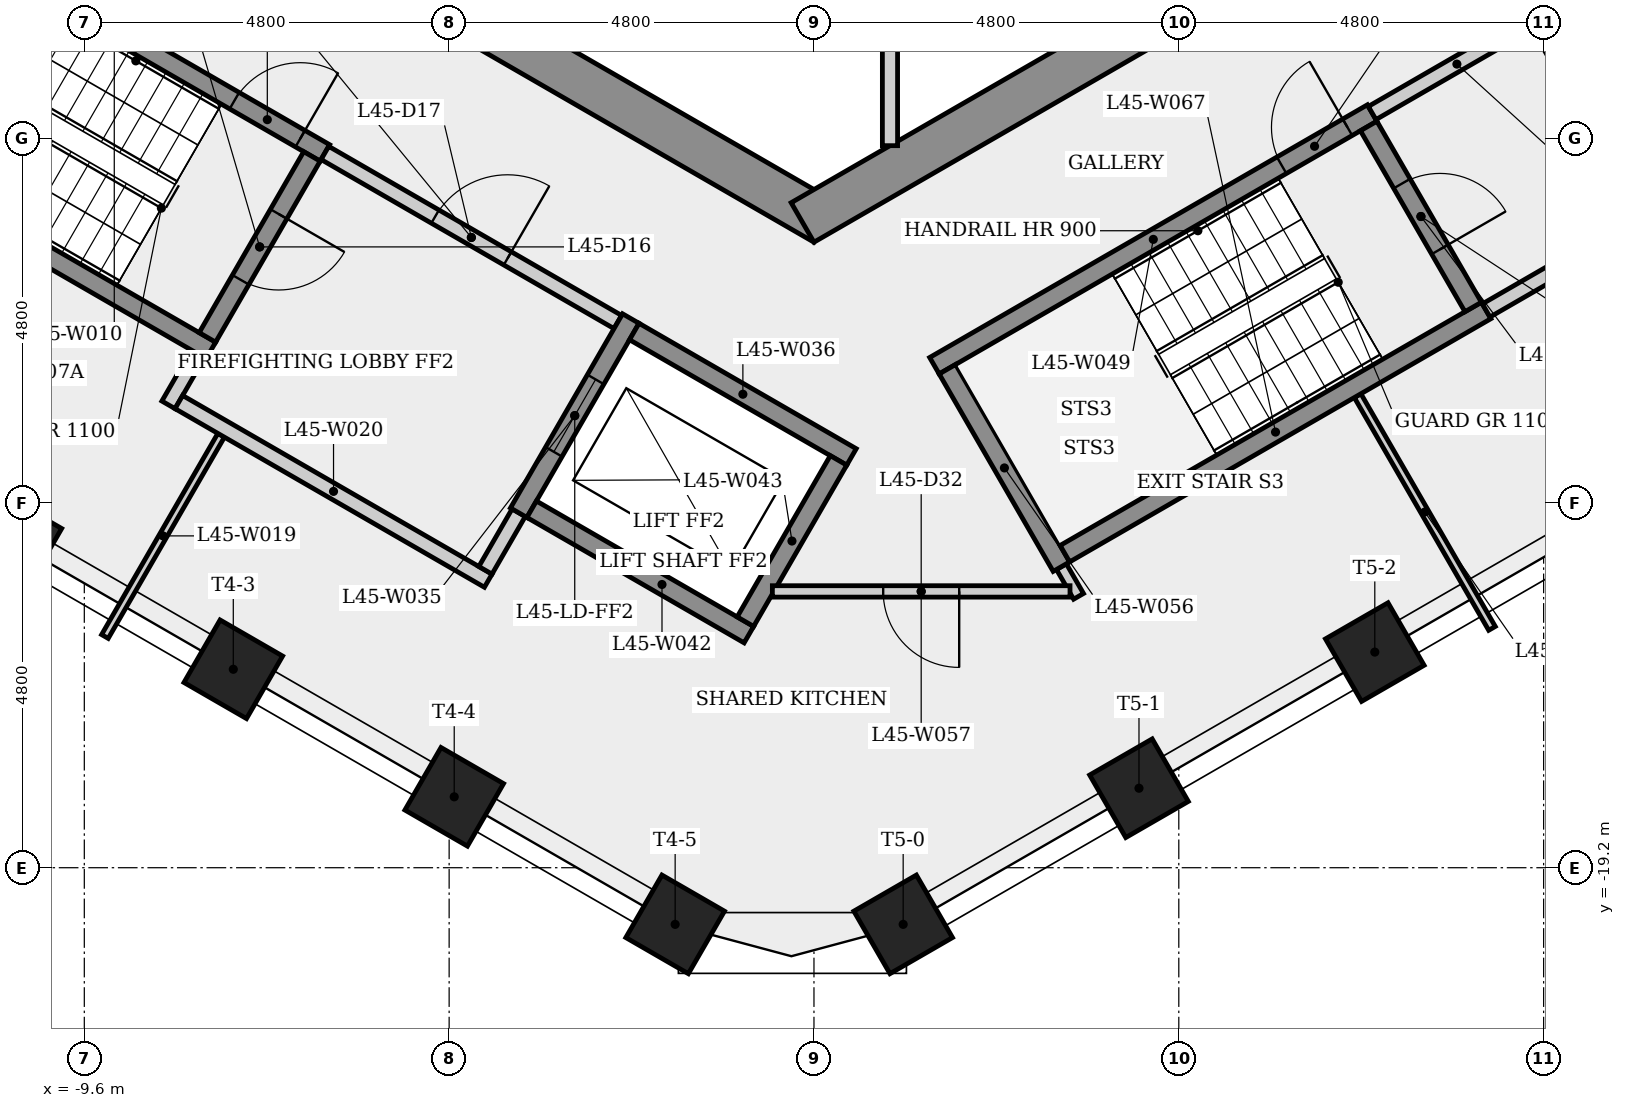
"""IFC4 building model, lengths in metres.
Left out: names, types, materials, properties, quantities, classifications, styles, units other than length and angle.
Written with IfcOpenShell. Run it as: python <this file> out.ifc"""

import sys

from ifc_helpers import new_model, si_unit, direction, frame, frame_2d, origin, origin_2d, place, context, subcontext, project, spatial, rectangle, extrude, element, fill, save


model = new_model("IFC4")
c1 = context("Model", 3, precision=1e-05, world=origin(), true_north=direction((0.0, 1.0)))
c2 = subcontext(c1, "Body", "Model", "MODEL_VIEW")
j1 = project(units=[si_unit("LENGTHUNIT", "METRE"), si_unit("PLANEANGLEUNIT", "RADIAN")], contexts=[c1])
p1 = place(None, origin())
s1 = spatial("IfcSite", under=j1, at=p1, CompositionType="ELEMENT")
p2 = place(p1, origin())
s2 = spatial("IfcBuilding", under=s1, at=p2, CompositionType="ELEMENT")
p3 = place(p2, frame((0.0, 0.0, 169.7)))
s3 = spatial("IfcBuildingStorey", under=s2, at=p3, CompositionType="ELEMENT", Elevation=169.7)
p4 = place(p3, frame((-9.35, -5.225, 0.0), z_axis=(0.0, 0.0, 1.0), x_axis=(0.866023993627, -0.500002442456, 0.0)))
e1 = element("IfcWall", 1, at=p4, inside=s3, PredefinedType="SHEAR", context=c2, shape_type="SweptSolid", body=[
    extrude(rectangle(XDim=10.97, YDim=0.6, at=frame_2d((5.485, 0.0))), origin(), (0.0, 0.0, 1.0), 3.4),
])
p5 = place(p4, frame((5.045, 0.0, 0.0)))
e2 = element("IfcOpeningElement", 2, at=p5, cuts=e1, PredefinedType="OPENING", context=c2, shape_type="SweptSolid", body=[
    extrude(rectangle(XDim=0.9, YDim=2.1, at=frame_2d((0.45, 1.05))), frame((0.0, 0.31, 0.0), z_axis=(0.0, -1.0, 0.0), x_axis=(1.0, 0.0, 0.0)), (0.0, 0.0, 1.0), 0.62),
])
p6 = place(p3, frame((-0.15, -10.71, 0.0), z_axis=(0.0, 0.0, 1.0), x_axis=(0.866023993627, 0.500002442456, 0.0)))
e3 = element("IfcWall", 3, at=p6, inside=s3, PredefinedType="SHEAR", context=c2, shape_type="SweptSolid", body=[
    extrude(rectangle(XDim=10.97, YDim=0.6, at=frame_2d((5.485, 0.0))), origin(), (0.0, 0.0, 1.0), 3.4),
])
p7 = place(p6, frame((7.281, 0.0, 0.0)))
e4 = element("IfcOpeningElement", 4, at=p7, cuts=e3, PredefinedType="OPENING", context=c2, shape_type="SweptSolid", body=[
    extrude(rectangle(XDim=0.9, YDim=2.1, at=frame_2d((0.45, 1.05))), frame((0.0, 0.31, 0.0), z_axis=(0.0, -1.0, 0.0), x_axis=(1.0, 0.0, 0.0)), (0.0, 0.0, 1.0), 0.62),
])
for number, where, z_axis, x_axis in (
    (5, (-10.547, -14.911, 0.0), (0.0, 0.0, 1.0), (-0.5, -0.866, 0.0)),
    (6, (-7.64, -16.589, 0.0), (0.0, 0.0, 1.0), (-0.5, -0.866, 0.0)),
    (7, (-4.733, -18.267, 0.0), (0.0, 0.0, 1.0), (-0.5, -0.866, 0.0)),
    (8, (-1.826, -19.946, 0.0), (0.0, 0.0, 1.0), (-0.5, -0.866, 0.0)),
    (9, (1.174, -19.946, 0.0), (0.0, 0.0, 1.0), (0.5, -0.866, 0.0)),
    (10, (4.276, -18.154, 0.0), (0.0, 0.0, 1.0), (0.5, -0.866, 0.0)),
    (11, (7.379, -16.363, 0.0), (0.0, 0.0, 1.0), (0.5, -0.866, 0.0)),
):
    element("IfcColumn", number, at=place(p3, frame(where, z_axis=z_axis, x_axis=x_axis)), inside=s3, PredefinedType="COLUMN", context=c2, shape_type="SweptSolid", body=[
        extrude(rectangle(XDim=0.95, YDim=0.95, at=origin_2d()), origin(), (0.0, 0.0, 1.0), 3.4),
    ])
p8 = place(p3, frame((-11.977, -6.595, 0.0), z_axis=(0.0, 0.0, 1.0), x_axis=(0.866025499775, -0.499999833739, 0.0)))
e12 = element("IfcWall", 12, at=p8, inside=s3, PredefinedType="SHEAR", context=c2, shape_type="SweptSolid", body=[
    extrude(rectangle(XDim=6.4, YDim=0.25, at=frame_2d((3.2, 0.0))), origin(), (0.0, 0.0, 1.0), 3.05),
])
p9 = place(p8, frame((5.025, 0.0, 0.0)))
e13 = element("IfcOpeningElement", 13, at=p9, cuts=e12, PredefinedType="OPENING", context=c2, shape_type="SweptSolid", body=[
    extrude(rectangle(XDim=1.0, YDim=2.1, at=frame_2d((0.5, 1.05))), frame((0.0, 0.135, 0.0), z_axis=(0.0, -1.0, 0.0), x_axis=(1.0, 0.0, 0.0)), (0.0, 0.0, 1.0), 0.27),
])
p10 = place(p3, frame((-8.493, -13.11, 0.0), z_axis=(0.0, 0.0, 1.0), x_axis=(0.500067724834, 0.865986299303, 0.0)))
e14 = element("IfcWall", 14, at=p10, inside=s3, PredefinedType="PARTITIONING", context=c2, shape_type="SweptSolid", body=[
    extrude(rectangle(XDim=0.775, YDim=0.2, at=frame_2d((0.388, 0.0))), origin(), (0.0, 0.0, 1.0), 3.05),
])
p11 = place(p3, frame((-7.935, -12.393, 0.0), z_axis=(0.0, 0.0, 1.0), x_axis=(-0.866025499775, 0.499999833739, 0.0)))
e15 = element("IfcWall", 15, at=p11, inside=s3, PredefinedType="SHEAR", context=c2, shape_type="SweptSolid", body=[
    extrude(rectangle(XDim=6.4, YDim=0.25, at=frame_2d((3.2, 0.0))), origin(), (0.0, 0.0, 1.0), 3.05),
])
p12 = place(p3, frame((-7.8, -13.51, 0.0), z_axis=(0.0, 0.0, 1.0), x_axis=(-0.500003532061, -0.866023364538, 0.0)))
e16 = element("IfcWall", 16, at=p12, inside=s3, PredefinedType="PARTITIONING", context=c2, shape_type="SweptSolid", body=[
    extrude(rectangle(XDim=3.058, YDim=0.1, at=frame_2d((1.529, 0.0))), origin(), (0.0, 0.0, 1.0), 3.05),
])
p13 = place(p3, frame((-8.356, -13.073, 0.0), z_axis=(0.0, 0.0, 1.0), x_axis=(0.866038532462, -0.499977259774, 0.0)))
e17 = element("IfcWall", 17, at=p13, inside=s3, PredefinedType="PARTITIONING", context=c2, shape_type="SweptSolid", body=[
    extrude(rectangle(XDim=4.7, YDim=0.2, at=frame_2d((2.35, 0.0))), origin(), (0.0, 0.0, 1.0), 3.05),
])
p14 = place(p3, frame((-6.605, -9.841, 0.0), z_axis=(0.0, 0.0, 1.0), x_axis=(-0.499996545922, -0.866027397988, 0.0)))
e18 = element("IfcWall", 18, at=p14, inside=s3, PredefinedType="SHEAR", context=c2, shape_type="SweptSolid", body=[
    extrude(rectangle(XDim=2.75, YDim=0.25, at=frame_2d((1.375, 0.0))), origin(), (0.0, 0.0, 1.0), 3.05),
])
p15 = place(p14, frame((0.875, 0.0, 0.0)))
e19 = element("IfcOpeningElement", 19, at=p15, cuts=e18, PredefinedType="OPENING", context=c2, shape_type="SweptSolid", body=[
    extrude(rectangle(XDim=1.0, YDim=2.1, at=frame_2d((0.5, 1.05))), frame((0.0, 0.135, 0.0), z_axis=(0.0, -1.0, 0.0), x_axis=(1.0, 0.0, 0.0)), (0.0, 0.0, 1.0), 0.27),
])
p16 = place(p3, frame((-6.435, -9.795, 0.0), z_axis=(0.0, 0.0, 1.0), x_axis=(0.866012907634, -0.500021643343, 0.0)))
e20 = element("IfcWall", 20, at=p16, inside=s3, PredefinedType="PARTITIONING", context=c2, shape_type="SweptSolid", body=[
    extrude(rectangle(XDim=4.45, YDim=0.2, at=frame_2d((2.225, 0.0))), origin(), (0.0, 0.0, 1.0), 3.05),
])
p17 = place(p16, frame((1.675, 0.0, 0.0)))
e21 = element("IfcOpeningElement", 21, at=p17, cuts=e20, PredefinedType="OPENING", context=c2, shape_type="SweptSolid", body=[
    extrude(rectangle(XDim=1.1, YDim=2.1, at=frame_2d((0.55, 1.05))), frame((0.0, 0.11, 0.0), z_axis=(0.0, -1.0, 0.0), x_axis=(1.0, 0.0, 0.0)), (0.0, 0.0, 1.0), 0.22),
])
p18 = place(p3, frame((-3.885, -14.529, 0.0), z_axis=(0.0, 0.0, 1.0), x_axis=(-0.499859285417, -0.866106630146, 0.0)))
e22 = element("IfcWall", 22, at=p18, inside=s3, PredefinedType="PARTITIONING", context=c2, shape_type="SweptSolid", body=[
    extrude(rectangle(XDim=0.875, YDim=0.2, at=frame_2d((0.438, 0.0))), origin(), (0.0, 0.0, 1.0), 3.05),
])
p19 = place(p3, frame((-2.41, -11.974, 0.0), z_axis=(0.0, 0.0, 1.0), x_axis=(-0.500001826776, -0.866024349092, 0.0)))
e23 = element("IfcWall", 23, at=p19, inside=s3, PredefinedType="SHEAR", context=c2, shape_type="SweptSolid", body=[
    extrude(rectangle(XDim=2.95, YDim=0.25, at=frame_2d((1.475, 0.0))), origin(), (0.0, 0.0, 1.0), 3.05),
])
p20 = place(p19, frame((0.925, 0.0, 0.0)))
e24 = element("IfcOpeningElement", 24, at=p20, cuts=e23, PredefinedType="OPENING", context=c2, shape_type="SweptSolid", body=[
    extrude(rectangle(XDim=1.1, YDim=2.1, at=frame_2d((0.55, 1.05))), frame((0.0, 0.135, 0.0), z_axis=(0.0, -1.0, 0.0), x_axis=(1.0, 0.0, 0.0)), (0.0, 0.0, 1.0), 0.27),
])
p21 = place(p3, frame((-2.364, -12.145, 0.0), z_axis=(0.0, 0.0, 1.0), x_axis=(0.866040211805, -0.499974350878, 0.0)))
e25 = element("IfcWall", 25, at=p21, inside=s3, PredefinedType="SHEAR", context=c2, shape_type="SweptSolid", body=[
    extrude(rectangle(XDim=3.3, YDim=0.25, at=frame_2d((1.65, 0.0))), origin(), (0.0, 0.0, 1.0), 3.05),
])
p22 = place(p3, frame((-0.856, -16.133, 0.0), z_axis=(0.0, 0.0, 1.0), x_axis=(-0.866021716278, 0.500006386895, 0.0)))
e26 = element("IfcWall", 26, at=p22, inside=s3, PredefinedType="SHEAR", context=c2, shape_type="SweptSolid", body=[
    extrude(rectangle(XDim=3.3, YDim=0.25, at=frame_2d((1.65, 0.0))), origin(), (0.0, 0.0, 1.0), 3.05),
])
p23 = place(p3, frame((-0.902, -15.962, 0.0), z_axis=(0.0, 0.0, 1.0), x_axis=(0.500061746146, 0.865989751695, 0.0)))
e27 = element("IfcWall", 27, at=p23, inside=s3, PredefinedType="SHEAR", context=c2, shape_type="SweptSolid", body=[
    extrude(rectangle(XDim=2.45, YDim=0.25, at=frame_2d((1.225, 0.0))), origin(), (0.0, 0.0, 1.0), 3.4),
])
p24 = place(p3, frame((1.0, -5.25, 0.0), z_axis=(0.0, 0.0, 1.0), x_axis=(0.0, -1.0, 0.0)))
e28 = element("IfcWall", 28, at=p24, inside=s3, PredefinedType="PARTITIONING", context=c2, shape_type="SweptSolid", body=[
    extrude(rectangle(XDim=4.449, YDim=0.2, at=frame_2d((2.225, 0.0))), origin(), (0.0, 0.0, 1.0), 3.05),
])
p25 = place(p3, frame((1.585, -12.595, 0.0), z_axis=(0.0, 0.0, 1.0), x_axis=(0.866036417653, 0.499980922934, 0.0)))
e29 = element("IfcWall", 29, at=p25, inside=s3, PredefinedType="SHEAR", context=c2, shape_type="SweptSolid", body=[
    extrude(rectangle(XDim=6.65, YDim=0.25, at=frame_2d((3.325, 0.0))), origin(), (0.0, 0.0, 1.0), 3.05),
])
p26 = place(p25, frame((5.275, 0.0, 0.0)))
e30 = element("IfcOpeningElement", 30, at=p26, cuts=e29, PredefinedType="OPENING", context=c2, shape_type="SweptSolid", body=[
    extrude(rectangle(XDim=1.0, YDim=2.1, at=frame_2d((0.5, 1.05))), frame((0.0, 0.135, 0.0), z_axis=(0.0, -1.0, 0.0), x_axis=(1.0, 0.0, 0.0)), (0.0, 0.0, 1.0), 0.27),
])
p27 = place(p3, frame((3.256, -15.239, 0.0), z_axis=(0.0, 0.0, 1.0), x_axis=(0.500097243556, -0.865969252911, 0.0)))
e31 = element("IfcWall", 31, at=p27, inside=s3, PredefinedType="PARTITIONING", context=c2, shape_type="SweptSolid", body=[
    extrude(rectangle(XDim=0.451, YDim=0.15, at=frame_2d((0.226, 0.0))), origin(), (0.0, 0.0, 1.0), 3.05),
])
p28 = place(p3, frame((3.256, -15.239, 0.0), z_axis=(0.0, 0.0, 1.0), x_axis=(-0.50002537861, 0.866010750942, 0.0)))
e32 = element("IfcWall", 32, at=p28, inside=s3, PredefinedType="SHEAR", context=c2, shape_type="SweptSolid", body=[
    extrude(rectangle(XDim=3.0, YDim=0.25, at=frame_2d((1.5, 0.0))), origin(), (0.0, 0.0, 1.0), 3.05),
])
p29 = place(p3, frame((3.369, -15.565, 0.0), z_axis=(0.0, 0.0, 1.0), x_axis=(-1.0, 0.0, 0.0)))
e33 = element("IfcWall", 33, at=p29, inside=s3, PredefinedType="PARTITIONING", context=c2, shape_type="SweptSolid", body=[
    extrude(rectangle(XDim=3.916, YDim=0.15, at=frame_2d((1.958, 0.0))), origin(), (0.0, 0.0, 1.0), 3.05),
])
p30 = place(p29, frame((1.458, 0.0, 0.0)))
e34 = element("IfcOpeningElement", 34, at=p30, cuts=e33, PredefinedType="OPENING", context=c2, shape_type="SweptSolid", body=[
    extrude(rectangle(XDim=1.0, YDim=2.1, at=frame_2d((0.5, 1.05))), frame((0.0, 0.085, 0.0), z_axis=(0.0, -1.0, 0.0), x_axis=(1.0, 0.0, 0.0)), (0.0, 0.0, 1.0), 0.17),
])
p31 = place(p3, frame((7.153, -12.989, 0.0), z_axis=(0.0, 0.0, 1.0), x_axis=(0.500045204515, -0.865999303373, 0.0)))
e35 = element("IfcWall", 35, at=p31, inside=s3, PredefinedType="PARTITIONING", context=c2, shape_type="SweptSolid", body=[
    extrude(rectangle(XDim=3.536, YDim=0.1, at=frame_2d((1.768, 0.0))), origin(), (0.0, 0.0, 1.0), 3.05),
])
p32 = place(p3, frame((3.301, -15.068, 0.0), z_axis=(0.0, 0.0, 1.0), x_axis=(0.866035036182, 0.499983315828, 0.0)))
e36 = element("IfcWall", 36, at=p32, inside=s3, PredefinedType="SHEAR", context=c2, shape_type="SweptSolid", body=[
    extrude(rectangle(XDim=6.4, YDim=0.25, at=frame_2d((3.2, 0.0))), origin(), (0.0, 0.0, 1.0), 3.05),
])
p33 = place(p3, frame((7.298, -9.441, 0.0), z_axis=(0.0, 0.0, 1.0), x_axis=(0.500034990121, -0.866005201286, 0.0)))
e37 = element("IfcWall", 37, at=p33, inside=s3, PredefinedType="SHEAR", context=c2, shape_type="SweptSolid", body=[
    extrude(rectangle(XDim=2.75, YDim=0.25, at=frame_2d((1.375, 0.0))), origin(), (0.0, 0.0, 1.0), 3.05),
])
p34 = place(p33, frame((0.875, 0.0, 0.0)))
e38 = element("IfcOpeningElement", 38, at=p34, cuts=e37, PredefinedType="OPENING", context=c2, shape_type="SweptSolid", body=[
    extrude(rectangle(XDim=1.0, YDim=2.1, at=frame_2d((0.5, 1.05))), frame((0.0, 0.135, 0.0), z_axis=(0.0, -1.0, 0.0), x_axis=(1.0, 0.0, 0.0)), (0.0, 0.0, 1.0), 0.27),
])
p35 = place(p3, frame((7.344, -9.27, 0.0), z_axis=(0.0, 0.0, 1.0), x_axis=(0.866005588531, 0.500034319456, 0.0)))
e39 = element("IfcWall", 39, at=p35, inside=s3, PredefinedType="PARTITIONING", context=c2, shape_type="SweptSolid", body=[
    extrude(rectangle(XDim=2.575, YDim=0.2, at=frame_2d((1.288, 0.0))), origin(), (0.0, 0.0, 1.0), 3.05),
])
p36 = place(p3, frame((9.537, -8.119, 0.0), z_axis=(0.0, 0.0, 1.0), x_axis=(0.499990139034, -0.866031096941, 0.0)))
e40 = element("IfcWall", 40, at=p36, inside=s3, PredefinedType="PARTITIONING", context=c2, shape_type="SweptSolid", body=[
    extrude(rectangle(XDim=3.0, YDim=0.2, at=frame_2d((1.5, 0.0))), origin(), (0.0, 0.0, 1.0), 3.05),
])
p37 = place(p36, frame((0.935, 0.0, 0.0)))
e41 = element("IfcOpeningElement", 41, at=p37, cuts=e40, PredefinedType="OPENING", context=c2, shape_type="SweptSolid", body=[
    extrude(rectangle(XDim=1.0, YDim=2.1, at=frame_2d((0.5, 1.05))), frame((0.0, 0.11, 0.0), z_axis=(0.0, -1.0, 0.0), x_axis=(1.0, 0.0, 0.0)), (0.0, 0.0, 1.0), 0.22),
])
p38 = place(p3, frame((10.901, -10.681, 0.0), z_axis=(0.0, 0.0, 1.0), x_axis=(-0.866007538022, -0.500030943131, 0.0)))
e42 = element("IfcWall", 42, at=p38, inside=s3, PredefinedType="PARTITIONING", context=c2, shape_type="SweptSolid", body=[
    extrude(rectangle(XDim=2.375, YDim=0.2, at=frame_2d((1.188, 0.0))), origin(), (0.0, 0.0, 1.0), 3.05),
])
p39 = place(p9, origin())
e43 = element("IfcDoor", 43, at=p39, inside=s3, OperationType="SINGLE_SWING_RIGHT", PredefinedType="DOOR", context=c2, shape_type="SweptSolid", body=[
    extrude(rectangle(XDim=1.0, YDim=2.1, at=frame_2d((0.5, 1.05))), frame((0.0, 0.025, 0.0), z_axis=(0.0, -1.0, 0.0), x_axis=(1.0, 0.0, 0.0)), (0.0, 0.0, 1.0), 0.05),
])
fill(e13, e43)
p40 = place(p15, origin())
e44 = element("IfcDoor", 44, at=p40, inside=s3, OperationType="SINGLE_SWING_LEFT", PredefinedType="DOOR", context=c2, shape_type="SweptSolid", body=[
    extrude(rectangle(XDim=1.0, YDim=2.1, at=frame_2d((0.5, 1.05))), frame((0.0, 0.025, 0.0), z_axis=(0.0, -1.0, 0.0), x_axis=(1.0, 0.0, 0.0)), (0.0, 0.0, 1.0), 0.05),
])
fill(e19, e44)
p41 = place(p17, origin())
e45 = element("IfcDoor", 45, at=p41, inside=s3, OperationType="SINGLE_SWING_RIGHT", PredefinedType="DOOR", context=c2, shape_type="SweptSolid", body=[
    extrude(rectangle(XDim=1.1, YDim=2.1, at=frame_2d((0.55, 1.05))), frame((0.0, 0.025, 0.0), z_axis=(0.0, -1.0, 0.0), x_axis=(1.0, 0.0, 0.0)), (0.0, 0.0, 1.0), 0.05),
])
fill(e21, e45)
p42 = place(p20, origin())
e46 = element("IfcDoor", 46, at=p42, inside=s3, OperationType="SLIDING_TO_LEFT", PredefinedType="DOOR", context=c2, shape_type="SweptSolid", body=[
    extrude(rectangle(XDim=1.1, YDim=2.1, at=frame_2d((0.55, 1.05))), frame((0.0, 0.025, 0.0), z_axis=(0.0, -1.0, 0.0), x_axis=(1.0, 0.0, 0.0)), (0.0, 0.0, 1.0), 0.05),
])
fill(e24, e46)
p43 = place(p26, origin())
e47 = element("IfcDoor", 47, at=p43, inside=s3, OperationType="SINGLE_SWING_RIGHT", PredefinedType="DOOR", context=c2, shape_type="SweptSolid", body=[
    extrude(rectangle(XDim=1.0, YDim=2.1, at=frame_2d((0.5, 1.05))), frame((0.0, 0.025, 0.0), z_axis=(0.0, -1.0, 0.0), x_axis=(1.0, 0.0, 0.0)), (0.0, 0.0, 1.0), 0.05),
])
fill(e30, e47)
p44 = place(p34, origin())
e48 = element("IfcDoor", 48, at=p44, inside=s3, OperationType="SINGLE_SWING_RIGHT", PredefinedType="DOOR", context=c2, shape_type="SweptSolid", body=[
    extrude(rectangle(XDim=1.0, YDim=2.1, at=frame_2d((0.5, 1.05))), frame((0.0, 0.025, 0.0), z_axis=(0.0, -1.0, 0.0), x_axis=(1.0, 0.0, 0.0)), (0.0, 0.0, 1.0), 0.05),
])
fill(e38, e48)
p45 = place(p30, origin())
e49 = element("IfcDoor", 49, at=p45, inside=s3, OperationType="SINGLE_SWING_LEFT", PredefinedType="DOOR", context=c2, shape_type="SweptSolid", body=[
    extrude(rectangle(XDim=1.0, YDim=2.1, at=frame_2d((0.5, 1.05))), frame((0.0, 0.025, 0.0), z_axis=(0.0, -1.0, 0.0), x_axis=(1.0, 0.0, 0.0)), (0.0, 0.0, 1.0), 0.05),
])
fill(e34, e49)
save(model, sys.argv[1])
